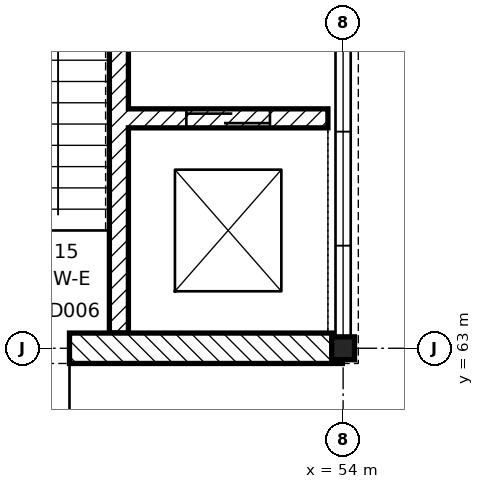
"""IFC4 building model, lengths in metres.
Left out: names, types, materials, properties, quantities, classifications, styles, units other than length and angle.
Written with IfcOpenShell. Run it as: python <this file> out.ifc"""

import sys

from ifc_helpers import new_model, si_unit, direction, frame, frame_2d, origin, origin_2d, place, context, subcontext, project, spatial, rectangle, i_section, extrude, element, fill, save


model = new_model("IFC4")
c1 = context("Model", 3, precision=1e-05, world=origin(), true_north=direction((0.0, 1.0)))
c2 = subcontext(c1, "Body", "Model", "MODEL_VIEW")
j1 = project(units=[si_unit("LENGTHUNIT", "METRE"), si_unit("PLANEANGLEUNIT", "RADIAN")], contexts=[c1])
p1 = place(None, origin())
s1 = spatial("IfcSite", under=j1, at=p1, CompositionType="ELEMENT")
p2 = place(p1, origin())
s2 = spatial("IfcBuilding", under=s1, at=p2, CompositionType="ELEMENT")
p3 = place(p2, origin())
s3 = spatial("IfcBuildingStorey", under=s2, at=p3, CompositionType="ELEMENT", Elevation=0.0)
p4 = place(p3, frame((54.0, 63.0, -0.6), z_axis=(0.0, 0.0, 1.0), x_axis=(1.0, 0.0, 0.0)))
e1 = element("IfcColumn", 1, at=p4, inside=s3, PredefinedType="COLUMN", context=c2, shape_type="SweptSolid", body=[
    extrude(i_section(OverallWidth=0.3, OverallDepth=0.3, WebThickness=0.011, FlangeThickness=0.019, FilletRadius=0.027, at=origin_2d()), origin(), (0.0, 0.0, 1.0), 5.8),
])
p5 = place(p3, frame((51.05, 63.2, 0.0), z_axis=(0.0, 0.0, 1.0), x_axis=(0.0, 1.0, 0.0)))
e2 = element("IfcWall", 2, at=p5, inside=s3, PredefinedType="SHEAR", context=c2, shape_type="SweptSolid", body=[
    extrude(rectangle(XDim=7.225, YDim=0.25, at=frame_2d((3.613, 0.0))), origin(), (0.0, 0.0, 1.0), 5.2),
])
p6 = place(p3, frame((51.175, 66.025, 0.0), z_axis=(0.0, 0.0, 1.0), x_axis=(1.0, 0.0, 0.0)))
e3 = element("IfcWall", 3, at=p6, inside=s3, PredefinedType="SHEAR", context=c2, shape_type="SweptSolid", body=[
    extrude(rectangle(XDim=2.625, YDim=0.25, at=frame_2d((1.312, 0.0))), origin(), (0.0, 0.0, 1.0), 5.2),
])
p7 = place(p6, frame((0.762, 0.0, 0.0)))
e4 = element("IfcOpeningElement", 4, at=p7, cuts=e3, PredefinedType="OPENING", context=c2, shape_type="SweptSolid", body=[
    extrude(rectangle(XDim=1.1, YDim=2.1, at=frame_2d((0.55, 1.05))), frame((0.0, 0.135, 0.0), z_axis=(0.0, -1.0, 0.0), x_axis=(1.0, 0.0, 0.0)), (0.0, 0.0, 1.0), 0.27),
])
p8 = place(p3, frame((51.05, 63.2, -1.5), z_axis=(0.0, 0.0, 1.0), x_axis=(0.0, 1.0, 0.0)))
e5 = element("IfcWall", 5, at=p8, inside=s3, PredefinedType="SHEAR", context=c2, shape_type="SweptSolid", body=[
    extrude(rectangle(XDim=2.95, YDim=0.25, at=frame_2d((1.475, 0.0))), origin(), (0.0, 0.0, 1.0), 1.5),
])
p9 = place(p3, frame((51.175, 66.025, -1.5), z_axis=(0.0, 0.0, 1.0), x_axis=(1.0, 0.0, 0.0)))
e6 = element("IfcWall", 6, at=p9, inside=s3, PredefinedType="SHEAR", context=c2, shape_type="SweptSolid", body=[
    extrude(rectangle(XDim=2.625, YDim=0.25, at=frame_2d((1.312, 0.0))), origin(), (0.0, 0.0, 1.0), 1.5),
])
p10 = place(p3, frame((53.99, 63.0, 0.0), z_axis=(0.0, 0.0, 1.0), x_axis=(-1.0, 0.0, 0.0)))
e7 = element("IfcWall", 7, at=p10, inside=s3, PredefinedType="STANDARD", context=c2, shape_type="SweptSolid", body=[
    extrude(rectangle(XDim=8.979, YDim=0.4, at=frame_2d((4.49, 0.0))), origin(), (0.0, 0.0, 1.0), 4.8),
])
p11 = place(p10, frame((3.59, 0.0, 0.0)))
e8 = element("IfcOpeningElement", 8, at=p11, cuts=e7, PredefinedType="OPENING", context=c2, shape_type="SweptSolid", body=[
    extrude(rectangle(XDim=1.8, YDim=2.1, at=frame_2d((0.9, 1.05))), frame((0.0, 0.21, 0.0), z_axis=(0.0, -1.0, 0.0), x_axis=(1.0, 0.0, 0.0)), (0.0, 0.0, 1.0), 0.42),
])
p12 = place(p10, frame((6.74, 0.0, 0.3)))
e9 = element("IfcOpeningElement", 9, at=p12, cuts=e7, PredefinedType="OPENING", context=c2, shape_type="SweptSolid", body=[
    extrude(rectangle(XDim=1.5, YDim=3.3, at=frame_2d((0.75, 1.65))), frame((0.0, 0.21, 0.0), z_axis=(0.0, -1.0, 0.0), x_axis=(1.0, 0.0, 0.0)), (0.0, 0.0, 1.0), 0.42),
])
p13 = place(p11, origin())
e10 = element("IfcDoor", 10, at=p13, inside=s3, OperationType="DOUBLE_DOOR_SINGLE_SWING", PredefinedType="DOOR", context=c2, shape_type="SweptSolid", body=[
    extrude(rectangle(XDim=1.8, YDim=2.1, at=frame_2d((0.9, 1.05))), frame((0.0, 0.025, 0.0), z_axis=(0.0, -1.0, 0.0), x_axis=(1.0, 0.0, 0.0)), (0.0, 0.0, 1.0), 0.05),
])
fill(e8, e10)
p14 = place(p7, origin())
e11 = element("IfcDoor", 11, at=p14, inside=s3, OperationType="SLIDING_TO_LEFT", PredefinedType="DOOR", context=c2, shape_type="SweptSolid", body=[
    extrude(rectangle(XDim=1.1, YDim=2.1, at=frame_2d((0.55, 1.05))), frame((0.0, 0.025, 0.0), z_axis=(0.0, -1.0, 0.0), x_axis=(1.0, 0.0, 0.0)), (0.0, 0.0, 1.0), 0.05),
])
fill(e4, e11)
save(model, sys.argv[1])
